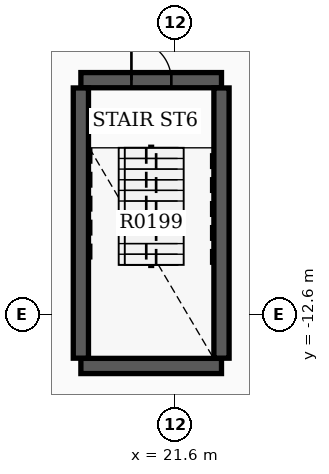
"""IFC4 building model, lengths in metres.
Left out: names, types, materials, properties, quantities, classifications, styles, units other than length and angle.
Written with IfcOpenShell. Run it as: python <this file> out.ifc"""

import sys

from ifc_helpers import new_model, si_unit, direction, frame, frame_2d, origin, place, context, subcontext, project, spatial, rectangle, extrude, element, fill, save


model = new_model("IFC4")
c1 = context("Model", 3, precision=1e-05, world=origin(), true_north=direction((0.0, 1.0)))
c2 = subcontext(c1, "Body", "Model", "MODEL_VIEW")
j1 = project(units=[si_unit("LENGTHUNIT", "METRE"), si_unit("PLANEANGLEUNIT", "RADIAN")], contexts=[c1])
p1 = place(None, origin())
s1 = spatial("IfcSite", under=j1, at=p1, CompositionType="ELEMENT")
p2 = place(p1, origin())
s2 = spatial("IfcBuilding", under=s1, at=p2, CompositionType="ELEMENT")
p3 = place(p2, frame((0.0, 0.0, 14.7)))
s3 = spatial("IfcBuildingStorey", under=s2, at=p3, CompositionType="ELEMENT", Elevation=14.7)
p4 = place(p3, frame((19.12, -6.43, 0.0), z_axis=(0.0, 0.0, 1.0), x_axis=(1.0, 0.0, 0.0)))
e1 = element("IfcWall", 1, at=p4, inside=s3, PredefinedType="SHEAR", context=c2, shape_type="SweptSolid", body=[
    extrude(rectangle(XDim=3.7, YDim=0.4, at=frame_2d((1.85, 0.0))), origin(), (0.0, 0.0, 1.0), 4.25),
])
p5 = place(p4, frame((1.33, 0.0, 0.0)))
e2 = element("IfcOpeningElement", 2, at=p5, cuts=e1, PredefinedType="OPENING", context=c2, shape_type="SweptSolid", body=[
    extrude(rectangle(XDim=1.05, YDim=2.15, at=frame_2d((0.525, 1.075))), frame((0.0, 0.21, 0.0), z_axis=(0.0, -1.0, 0.0), x_axis=(1.0, 0.0, 0.0)), (0.0, 0.0, 1.0), 0.42),
])
p6 = place(p3, frame((19.12, -13.95, 0.0), z_axis=(0.0, 0.0, 1.0), x_axis=(1.0, 0.0, 0.0)))
e3 = element("IfcWall", 3, at=p6, inside=s3, PredefinedType="SHEAR", context=c2, shape_type="SweptSolid", body=[
    extrude(rectangle(XDim=3.7, YDim=0.4, at=frame_2d((1.85, 0.0))), origin(), (0.0, 0.0, 1.0), 4.25),
])
for number, where, z_axis, x_axis in (
    (4, (19.12, -13.745, 0.0), (0.0, 0.0, 1.0), (0.0, 1.0, 0.0)),
    (5, (22.82, -13.745, 0.0), (0.0, 0.0, 1.0), (0.0, 1.0, 0.0)),
):
    element("IfcWall", number, at=place(p3, frame(where, z_axis=z_axis, x_axis=x_axis)), inside=s3, PredefinedType="SHEAR", context=c2, shape_type="SweptSolid", body=[
        extrude(rectangle(XDim=7.11, YDim=0.4, at=frame_2d((3.555, 0.0))), origin(), (0.0, 0.0, 1.0), 4.25),
    ])
p7 = place(p5, origin())
e6 = element("IfcDoor", 6, at=p7, inside=s3, OperationType="SINGLE_SWING_LEFT", PredefinedType="DOOR", context=c2, shape_type="SweptSolid", body=[
    extrude(rectangle(XDim=1.05, YDim=2.15, at=frame_2d((0.525, 1.075))), frame((0.0, 0.025, 0.0), z_axis=(0.0, -1.0, 0.0), x_axis=(1.0, 0.0, 0.0)), (0.0, 0.0, 1.0), 0.05),
])
fill(e2, e6)
save(model, sys.argv[1])
